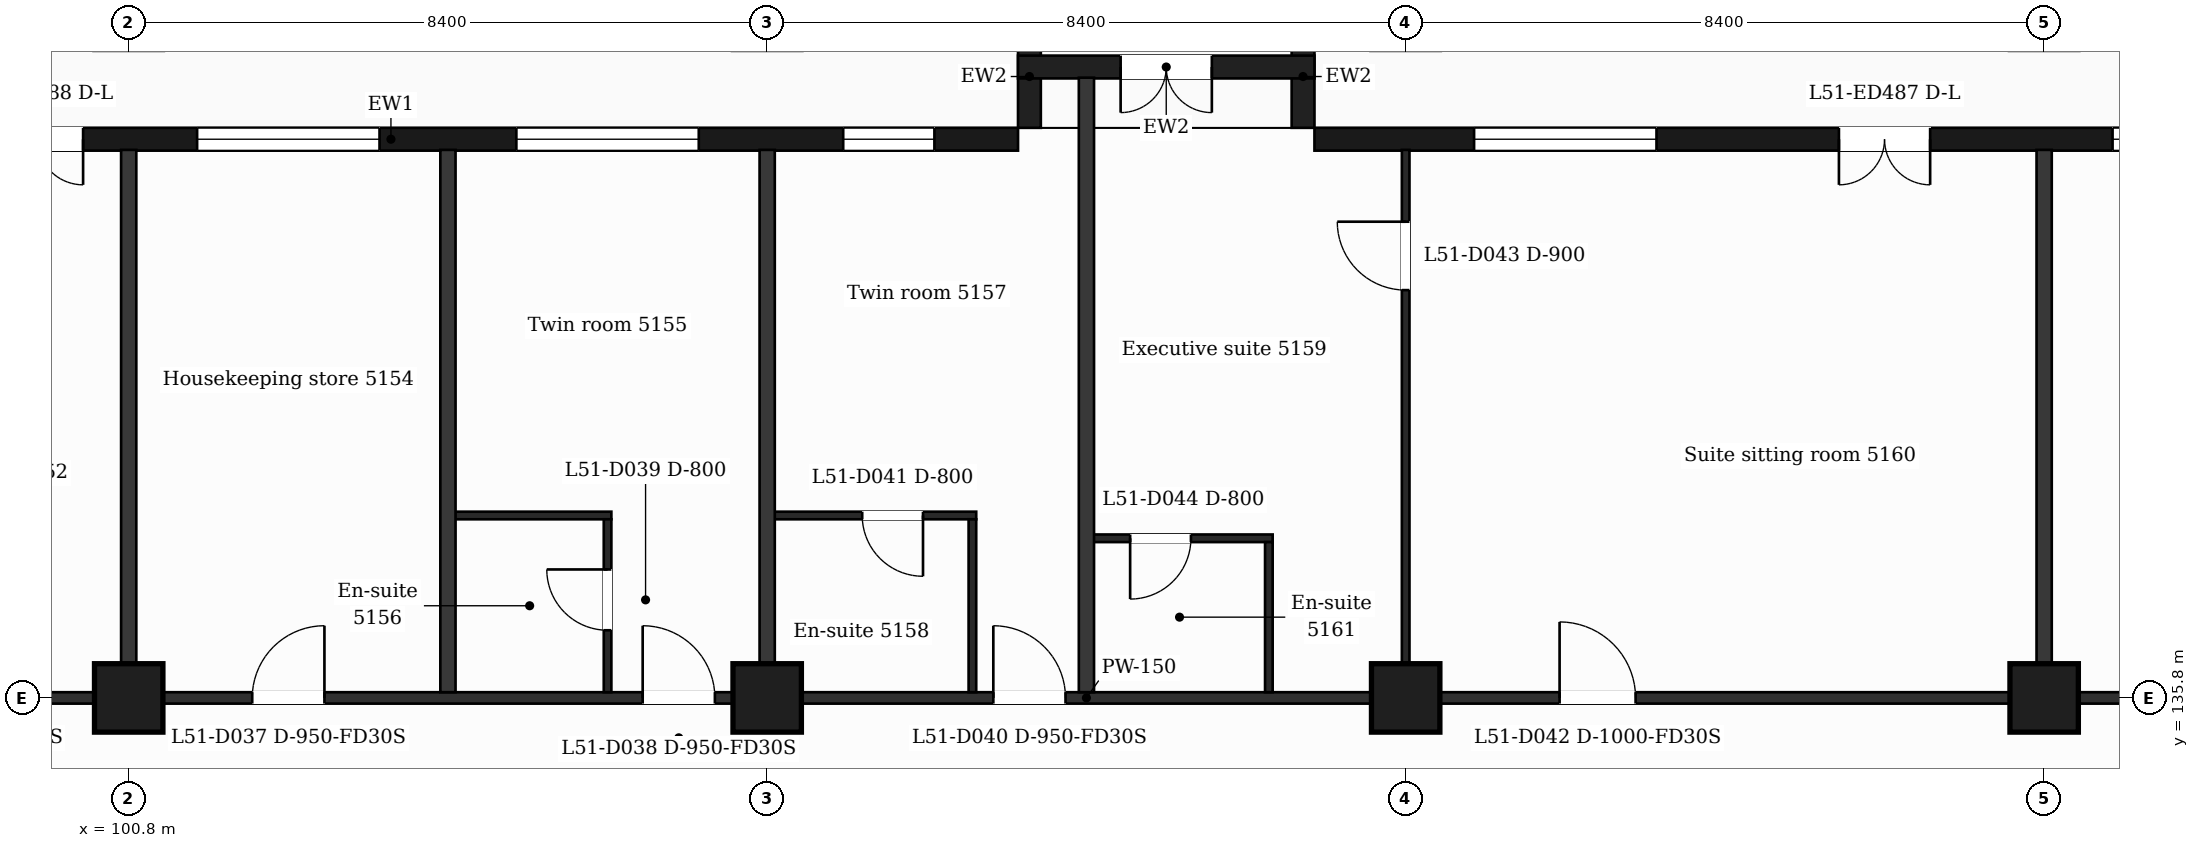
"""IFC4 building model, lengths in metres.
Left out: names, types, materials, properties, quantities, classifications, styles, units other than length and angle.
Written with IfcOpenShell. Run it as: python <this file> out.ifc"""

import sys

from ifc_helpers import new_model, si_unit, direction, frame, frame_2d, origin, origin_2d, place, context, subcontext, project, spatial, rectangle, extrude, element, fill, save


model = new_model("IFC4")
c1 = context("Model", 3, precision=1e-05, world=origin(), true_north=direction((0.0, 1.0)))
c2 = subcontext(c1, "Body", "Model", "MODEL_VIEW")
j1 = project(units=[si_unit("LENGTHUNIT", "METRE"), si_unit("PLANEANGLEUNIT", "RADIAN")], contexts=[c1])
p1 = place(None, origin())
s1 = spatial("IfcSite", under=j1, at=p1, CompositionType="ELEMENT")
p2 = place(p1, origin())
s2 = spatial("IfcBuilding", under=s1, at=p2, CompositionType="ELEMENT")
p3 = place(p2, frame((0.0, 0.0, 213.3)))
s3 = spatial("IfcBuildingStorey", under=s2, at=p3, CompositionType="ELEMENT", Elevation=213.3)
for number, where, z_axis, x_axis in (
    (1, (100.8, 135.8, 0.0), (0.0, 0.0, 1.0), (1.0, 0.0, 0.0)),
    (2, (109.2, 135.8, 0.0), (0.0, 0.0, 1.0), (1.0, 0.0, 0.0)),
    (3, (117.6, 135.8, 0.0), (0.0, 0.0, 1.0), (1.0, 0.0, 0.0)),
    (4, (126.0, 135.8, 0.0), (0.0, 0.0, 1.0), (1.0, 0.0, 0.0)),
):
    element("IfcColumn", number, at=place(p3, frame(where, z_axis=z_axis, x_axis=x_axis)), inside=s3, PredefinedType="COLUMN", context=c2, shape_type="SweptSolid", body=[
        extrude(rectangle(XDim=0.9, YDim=0.9, at=origin_2d()), origin(), (0.0, 0.0, 1.0), 3.7),
    ])
p4 = place(p3, frame((130.65, 143.15, 0.0), z_axis=(0.0, 0.0, 1.0), x_axis=(-1.0, 0.0, 0.0)))
e5 = element("IfcWall", 5, at=p4, inside=s3, PredefinedType="SOLIDWALL", context=c2, shape_type="SweptSolid", body=[
    extrude(rectangle(XDim=14.25, YDim=0.3, at=frame_2d((7.125, 0.0))), origin(), (0.0, 0.0, 1.0), 3.38),
])
p5 = place(p4, frame((1.35, 0.0, 0.9)))
e6 = element("IfcOpeningElement", 6, at=p5, cuts=e5, PredefinedType="OPENING", context=c2, shape_type="SweptSolid", body=[
    extrude(rectangle(XDim=2.4, YDim=2.1, at=frame_2d((1.2, 1.05))), frame((0.0, 0.16, 0.0), z_axis=(0.0, -1.0, 0.0), x_axis=(1.0, 0.0, 0.0)), (0.0, 0.0, 1.0), 0.32),
])
p6 = place(p4, frame((6.15, 0.0, 0.0)))
e7 = element("IfcOpeningElement", 7, at=p6, cuts=e5, PredefinedType="OPENING", context=c2, shape_type="SweptSolid", body=[
    extrude(rectangle(XDim=1.2, YDim=2.4, at=frame_2d((0.6, 1.2))), frame((0.0, 0.16, 0.0), z_axis=(0.0, -1.0, 0.0), x_axis=(1.0, 0.0, 0.0)), (0.0, 0.0, 1.0), 0.32),
])
p7 = place(p4, frame((9.75, 0.0, 0.9)))
e8 = element("IfcOpeningElement", 8, at=p7, cuts=e5, PredefinedType="OPENING", context=c2, shape_type="SweptSolid", body=[
    extrude(rectangle(XDim=2.4, YDim=2.1, at=frame_2d((1.2, 1.05))), frame((0.0, 0.16, 0.0), z_axis=(0.0, -1.0, 0.0), x_axis=(1.0, 0.0, 0.0)), (0.0, 0.0, 1.0), 0.32),
])
p8 = place(p3, frame((112.5, 143.15, 0.0), z_axis=(0.0, 0.0, 1.0), x_axis=(-1.0, 0.0, 0.0)))
e9 = element("IfcWall", 9, at=p8, inside=s3, PredefinedType="SOLIDWALL", context=c2, shape_type="SweptSolid", body=[
    extrude(rectangle(XDim=16.5, YDim=0.3, at=frame_2d((8.25, 0.0))), origin(), (0.0, 0.0, 1.0), 3.38),
])
p9 = place(p8, frame((1.1, 0.0, 0.9)))
e10 = element("IfcOpeningElement", 10, at=p9, cuts=e9, PredefinedType="OPENING", context=c2, shape_type="SweptSolid", body=[
    extrude(rectangle(XDim=1.2, YDim=2.1, at=frame_2d((0.6, 1.05))), frame((0.0, 0.16, 0.0), z_axis=(0.0, -1.0, 0.0), x_axis=(1.0, 0.0, 0.0)), (0.0, 0.0, 1.0), 0.32),
])
p10 = place(p8, frame((4.2, 0.0, 0.9)))
e11 = element("IfcOpeningElement", 11, at=p10, cuts=e9, PredefinedType="OPENING", context=c2, shape_type="SweptSolid", body=[
    extrude(rectangle(XDim=2.4, YDim=2.1, at=frame_2d((1.2, 1.05))), frame((0.0, 0.16, 0.0), z_axis=(0.0, -1.0, 0.0), x_axis=(1.0, 0.0, 0.0)), (0.0, 0.0, 1.0), 0.32),
])
p11 = place(p8, frame((8.4, 0.0, 0.9)))
e12 = element("IfcOpeningElement", 12, at=p11, cuts=e9, PredefinedType="OPENING", context=c2, shape_type="SweptSolid", body=[
    extrude(rectangle(XDim=2.4, YDim=2.1, at=frame_2d((1.2, 1.05))), frame((0.0, 0.16, 0.0), z_axis=(0.0, -1.0, 0.0), x_axis=(1.0, 0.0, 0.0)), (0.0, 0.0, 1.0), 0.32),
])
p12 = place(p8, frame((12.3, 0.0, 0.0)))
e13 = element("IfcOpeningElement", 13, at=p12, cuts=e9, PredefinedType="OPENING", context=c2, shape_type="SweptSolid", body=[
    extrude(rectangle(XDim=1.2, YDim=2.4, at=frame_2d((0.6, 1.2))), frame((0.0, 0.16, 0.0), z_axis=(0.0, -1.0, 0.0), x_axis=(1.0, 0.0, 0.0)), (0.0, 0.0, 1.0), 0.32),
])
p13 = place(p8, frame((14.1, 0.0, 0.9)))
e14 = element("IfcOpeningElement", 14, at=p13, cuts=e9, PredefinedType="OPENING", context=c2, shape_type="SweptSolid", body=[
    extrude(rectangle(XDim=1.2, YDim=2.1, at=frame_2d((0.6, 1.05))), frame((0.0, 0.16, 0.0), z_axis=(0.0, -1.0, 0.0), x_axis=(1.0, 0.0, 0.0)), (0.0, 0.0, 1.0), 0.32),
])
for number, where, z_axis, x_axis in (
    (15, (116.25, 143.3, 0.0), (0.0, 0.0, 1.0), (0.0, 1.0, 0.0)),
    (16, (112.65, 143.3, 0.0), (0.0, 0.0, 1.0), (0.0, 1.0, 0.0)),
):
    element("IfcWall", number, at=place(p3, frame(where, z_axis=z_axis, x_axis=x_axis)), inside=s3, PredefinedType="SOLIDWALL", context=c2, shape_type="SweptSolid", body=[
        extrude(rectangle(XDim=1.35, YDim=0.3, at=frame_2d((0.675, 0.0))), origin(), (0.0, 0.0, 1.0), 3.38),
    ])
p14 = place(p3, frame((116.4, 144.1, 0.0), z_axis=(0.0, 0.0, 1.0), x_axis=(-1.0, 0.0, 0.0)))
e17 = element("IfcWall", 17, at=p14, inside=s3, PredefinedType="SOLIDWALL", context=c2, shape_type="SweptSolid", body=[
    extrude(rectangle(XDim=3.9, YDim=0.3, at=frame_2d((1.95, 0.0))), origin(), (0.0, 0.0, 1.0), 3.38),
])
p15 = place(p14, frame((1.35, 0.0, 0.0)))
e18 = element("IfcOpeningElement", 18, at=p15, cuts=e17, PredefinedType="OPENING", context=c2, shape_type="SweptSolid", body=[
    extrude(rectangle(XDim=1.2, YDim=2.4, at=frame_2d((0.6, 1.2))), frame((0.0, 0.16, 0.0), z_axis=(0.0, -1.0, 0.0), x_axis=(1.0, 0.0, 0.0)), (0.0, 0.0, 1.0), 0.32),
])
p16 = place(p3, frame((90.895, 135.8, 0.0), z_axis=(0.0, 0.0, 1.0), x_axis=(1.0, 0.0, 0.0)))
e19 = element("IfcWall", 19, at=p16, inside=s3, PredefinedType="PARTITIONING", context=c2, shape_type="SweptSolid", body=[
    extrude(rectangle(XDim=45.011, YDim=0.15, at=frame_2d((22.505, 0.0))), origin(), (0.0, 0.0, 1.0), 3.38),
])
p17 = place(p16, frame((6.906, 0.0, 0.0)))
e20 = element("IfcOpeningElement", 20, at=p17, cuts=e19, PredefinedType="OPENING", context=c2, shape_type="SweptSolid", body=[
    extrude(rectangle(XDim=1.0, YDim=2.1, at=frame_2d((0.5, 1.05))), frame((0.0, 0.085, 0.0), z_axis=(0.0, -1.0, 0.0), x_axis=(1.0, 0.0, 0.0)), (0.0, 0.0, 1.0), 0.17),
])
p18 = place(p16, frame((11.531, 0.0, 0.0)))
e21 = element("IfcOpeningElement", 21, at=p18, cuts=e19, PredefinedType="OPENING", context=c2, shape_type="SweptSolid", body=[
    extrude(rectangle(XDim=0.95, YDim=2.1, at=frame_2d((0.475, 1.05))), frame((0.0, 0.085, 0.0), z_axis=(0.0, -1.0, 0.0), x_axis=(1.0, 0.0, 0.0)), (0.0, 0.0, 1.0), 0.17),
])
p19 = place(p16, frame((16.667, 0.0, 0.0)))
e22 = element("IfcOpeningElement", 22, at=p19, cuts=e19, PredefinedType="OPENING", context=c2, shape_type="SweptSolid", body=[
    extrude(rectangle(XDim=0.95, YDim=2.1, at=frame_2d((0.475, 1.05))), frame((0.0, 0.085, 0.0), z_axis=(0.0, -1.0, 0.0), x_axis=(1.0, 0.0, 0.0)), (0.0, 0.0, 1.0), 0.17),
])
p20 = place(p16, frame((21.281, 0.0, 0.0)))
e23 = element("IfcOpeningElement", 23, at=p20, cuts=e19, PredefinedType="OPENING", context=c2, shape_type="SweptSolid", body=[
    extrude(rectangle(XDim=0.95, YDim=2.1, at=frame_2d((0.475, 1.05))), frame((0.0, 0.085, 0.0), z_axis=(0.0, -1.0, 0.0), x_axis=(1.0, 0.0, 0.0)), (0.0, 0.0, 1.0), 0.17),
])
p21 = place(p16, frame((28.73, 0.0, 0.0)))
e24 = element("IfcOpeningElement", 24, at=p21, cuts=e19, PredefinedType="OPENING", context=c2, shape_type="SweptSolid", body=[
    extrude(rectangle(XDim=1.0, YDim=2.1, at=frame_2d((0.5, 1.05))), frame((0.0, 0.085, 0.0), z_axis=(0.0, -1.0, 0.0), x_axis=(1.0, 0.0, 0.0)), (0.0, 0.0, 1.0), 0.17),
])
p22 = place(p16, frame((39.814, 0.0, 0.0)))
e25 = element("IfcOpeningElement", 25, at=p22, cuts=e19, PredefinedType="OPENING", context=c2, shape_type="SweptSolid", body=[
    extrude(rectangle(XDim=0.95, YDim=2.1, at=frame_2d((0.475, 1.05))), frame((0.0, 0.085, 0.0), z_axis=(0.0, -1.0, 0.0), x_axis=(1.0, 0.0, 0.0)), (0.0, 0.0, 1.0), 0.17),
])
p23 = place(p3, frame((113.4, 137.9, 0.0), z_axis=(0.0, 0.0, 1.0), x_axis=(1.0, 0.0, 0.0)))
e26 = element("IfcWall", 26, at=p23, inside=s3, PredefinedType="PARTITIONING", context=c2, shape_type="SweptSolid", body=[
    extrude(rectangle(XDim=2.45, YDim=0.1, at=frame_2d((1.225, 0.0))), origin(), (0.0, 0.0, 1.0), 3.38),
])
p24 = place(p23, frame((0.575, 0.0, 0.0)))
e27 = element("IfcOpeningElement", 27, at=p24, cuts=e26, PredefinedType="OPENING", context=c2, shape_type="SweptSolid", body=[
    extrude(rectangle(XDim=0.8, YDim=2.1, at=frame_2d((0.4, 1.05))), frame((0.0, 0.06, 0.0), z_axis=(0.0, -1.0, 0.0), x_axis=(1.0, 0.0, 0.0)), (0.0, 0.0, 1.0), 0.12),
])
p25 = place(p3, frame((105.0, 138.2, 0.0), z_axis=(0.0, 0.0, 1.0), x_axis=(1.0, 0.0, 0.0)))
e28 = element("IfcWall", 28, at=p25, inside=s3, PredefinedType="PARTITIONING", context=c2, shape_type="SweptSolid", body=[
    extrude(rectangle(XDim=2.15, YDim=0.1, at=frame_2d((1.075, 0.0))), origin(), (0.0, 0.0, 1.0), 3.38),
])
p26 = place(p3, frame((109.2, 138.2, 0.0), z_axis=(0.0, 0.0, 1.0), x_axis=(1.0, 0.0, 0.0)))
e29 = element("IfcWall", 29, at=p26, inside=s3, PredefinedType="PARTITIONING", context=c2, shape_type="SweptSolid", body=[
    extrude(rectangle(XDim=2.75, YDim=0.1, at=frame_2d((1.375, 0.0))), origin(), (0.0, 0.0, 1.0), 3.38),
])
p27 = place(p26, frame((1.25, 0.0, 0.0)))
e30 = element("IfcOpeningElement", 30, at=p27, cuts=e29, PredefinedType="OPENING", context=c2, shape_type="SweptSolid", body=[
    extrude(rectangle(XDim=0.8, YDim=2.1, at=frame_2d((0.4, 1.05))), frame((0.0, 0.06, 0.0), z_axis=(0.0, -1.0, 0.0), x_axis=(1.0, 0.0, 0.0)), (0.0, 0.0, 1.0), 0.12),
])
for number, where, z_axis, x_axis in (
    (31, (100.8, 135.875, 0.0), (0.0, 0.0, 1.0), (0.0, 1.0, 0.0)),
    (32, (105.0, 135.875, 0.0), (0.0, 0.0, 1.0), (0.0, 1.0, 0.0)),
):
    element("IfcWall", number, at=place(p3, frame(where, z_axis=z_axis, x_axis=x_axis)), inside=s3, PredefinedType="PARTITIONING", context=c2, shape_type="SweptSolid", body=[
        extrude(rectangle(XDim=7.135, YDim=0.2, at=frame_2d((3.567, 0.0))), origin(), (0.0, 0.0, 1.0), 3.38),
    ])
p28 = place(p3, frame((107.1, 135.875, 0.0), z_axis=(0.0, 0.0, 1.0), x_axis=(0.0, 1.0, 0.0)))
e33 = element("IfcWall", 33, at=p28, inside=s3, PredefinedType="PARTITIONING", context=c2, shape_type="SweptSolid", body=[
    extrude(rectangle(XDim=2.275, YDim=0.1, at=frame_2d((1.137, 0.0))), origin(), (0.0, 0.0, 1.0), 3.38),
])
p29 = place(p28, frame((0.815, 0.0, 0.0)))
e34 = element("IfcOpeningElement", 34, at=p29, cuts=e33, PredefinedType="OPENING", context=c2, shape_type="SweptSolid", body=[
    extrude(rectangle(XDim=0.8, YDim=2.1, at=frame_2d((0.4, 1.05))), frame((0.0, 0.06, 0.0), z_axis=(0.0, -1.0, 0.0), x_axis=(1.0, 0.0, 0.0)), (0.0, 0.0, 1.0), 0.12),
])
p30 = place(p3, frame((109.2, 135.875, 0.0), z_axis=(0.0, 0.0, 1.0), x_axis=(0.0, 1.0, 0.0)))
e35 = element("IfcWall", 35, at=p30, inside=s3, PredefinedType="PARTITIONING", context=c2, shape_type="SweptSolid", body=[
    extrude(rectangle(XDim=7.135, YDim=0.2, at=frame_2d((3.567, 0.0))), origin(), (0.0, 0.0, 1.0), 3.38),
])
p31 = place(p3, frame((111.9, 135.875, 0.0), z_axis=(0.0, 0.0, 1.0), x_axis=(0.0, 1.0, 0.0)))
e36 = element("IfcWall", 36, at=p31, inside=s3, PredefinedType="PARTITIONING", context=c2, shape_type="SweptSolid", body=[
    extrude(rectangle(XDim=2.275, YDim=0.1, at=frame_2d((1.137, 0.0))), origin(), (0.0, 0.0, 1.0), 3.38),
])
p32 = place(p3, frame((113.4, 135.875, 0.0), z_axis=(0.0, 0.0, 1.0), x_axis=(0.0, 1.0, 0.0)))
e37 = element("IfcWall", 37, at=p32, inside=s3, PredefinedType="PARTITIONING", context=c2, shape_type="SweptSolid", body=[
    extrude(rectangle(XDim=8.085, YDim=0.2, at=frame_2d((4.042, 0.0))), origin(), (0.0, 0.0, 1.0), 3.38),
])
p33 = place(p3, frame((115.8, 135.875, 0.0), z_axis=(0.0, 0.0, 1.0), x_axis=(0.0, 1.0, 0.0)))
e38 = element("IfcWall", 38, at=p33, inside=s3, PredefinedType="PARTITIONING", context=c2, shape_type="SweptSolid", body=[
    extrude(rectangle(XDim=1.975, YDim=0.1, at=frame_2d((0.988, 0.0))), origin(), (0.0, 0.0, 1.0), 3.38),
])
p34 = place(p3, frame((117.6, 135.875, 0.0), z_axis=(0.0, 0.0, 1.0), x_axis=(0.0, 1.0, 0.0)))
e39 = element("IfcWall", 39, at=p34, inside=s3, PredefinedType="PARTITIONING", context=c2, shape_type="SweptSolid", body=[
    extrude(rectangle(XDim=7.135, YDim=0.1, at=frame_2d((3.567, 0.0))), origin(), (0.0, 0.0, 1.0), 3.38),
])
p35 = place(p34, frame((5.29, 0.0, 0.0)))
e40 = element("IfcOpeningElement", 40, at=p35, cuts=e39, PredefinedType="OPENING", context=c2, shape_type="SweptSolid", body=[
    extrude(rectangle(XDim=0.9, YDim=2.1, at=frame_2d((0.45, 1.05))), frame((0.0, 0.06, 0.0), z_axis=(0.0, -1.0, 0.0), x_axis=(1.0, 0.0, 0.0)), (0.0, 0.0, 1.0), 0.12),
])
p36 = place(p3, frame((126.0, 135.875, 0.0), z_axis=(0.0, 0.0, 1.0), x_axis=(0.0, 1.0, 0.0)))
e41 = element("IfcWall", 41, at=p36, inside=s3, PredefinedType="PARTITIONING", context=c2, shape_type="SweptSolid", body=[
    extrude(rectangle(XDim=7.135, YDim=0.2, at=frame_2d((3.567, 0.0))), origin(), (0.0, 0.0, 1.0), 3.38),
])
p37 = place(p5, origin())
e42 = element("IfcWindow", 42, at=p37, inside=s3, PartitioningType="SINGLE_PANEL", PredefinedType="WINDOW", context=c2, shape_type="SweptSolid", body=[
    extrude(rectangle(XDim=2.4, YDim=2.1, at=frame_2d((1.2, 1.05))), frame((0.0, 0.03, 0.0), z_axis=(0.0, -1.0, 0.0), x_axis=(1.0, 0.0, 0.0)), (0.0, 0.0, 1.0), 0.06),
])
fill(e6, e42)
p38 = place(p6, origin())
e43 = element("IfcDoor", 43, at=p38, inside=s3, OperationType="DOUBLE_DOOR_SINGLE_SWING", PredefinedType="DOOR", context=c2, shape_type="SweptSolid", body=[
    extrude(rectangle(XDim=1.2, YDim=2.4, at=frame_2d((0.6, 1.2))), frame((0.0, 0.025, 0.0), z_axis=(0.0, -1.0, 0.0), x_axis=(1.0, 0.0, 0.0)), (0.0, 0.0, 1.0), 0.05),
])
fill(e7, e43)
p39 = place(p7, origin())
e44 = element("IfcWindow", 44, at=p39, inside=s3, PartitioningType="SINGLE_PANEL", PredefinedType="WINDOW", context=c2, shape_type="SweptSolid", body=[
    extrude(rectangle(XDim=2.4, YDim=2.1, at=frame_2d((1.2, 1.05))), frame((0.0, 0.03, 0.0), z_axis=(0.0, -1.0, 0.0), x_axis=(1.0, 0.0, 0.0)), (0.0, 0.0, 1.0), 0.06),
])
fill(e8, e44)
p40 = place(p9, origin())
e45 = element("IfcWindow", 45, at=p40, inside=s3, PartitioningType="SINGLE_PANEL", PredefinedType="WINDOW", context=c2, shape_type="SweptSolid", body=[
    extrude(rectangle(XDim=1.2, YDim=2.1, at=frame_2d((0.6, 1.05))), frame((0.0, 0.03, 0.0), z_axis=(0.0, -1.0, 0.0), x_axis=(1.0, 0.0, 0.0)), (0.0, 0.0, 1.0), 0.06),
])
fill(e10, e45)
p41 = place(p10, origin())
e46 = element("IfcWindow", 46, at=p41, inside=s3, PartitioningType="SINGLE_PANEL", PredefinedType="WINDOW", context=c2, shape_type="SweptSolid", body=[
    extrude(rectangle(XDim=2.4, YDim=2.1, at=frame_2d((1.2, 1.05))), frame((0.0, 0.03, 0.0), z_axis=(0.0, -1.0, 0.0), x_axis=(1.0, 0.0, 0.0)), (0.0, 0.0, 1.0), 0.06),
])
fill(e11, e46)
p42 = place(p11, origin())
e47 = element("IfcWindow", 47, at=p42, inside=s3, PartitioningType="SINGLE_PANEL", PredefinedType="WINDOW", context=c2, shape_type="SweptSolid", body=[
    extrude(rectangle(XDim=2.4, YDim=2.1, at=frame_2d((1.2, 1.05))), frame((0.0, 0.03, 0.0), z_axis=(0.0, -1.0, 0.0), x_axis=(1.0, 0.0, 0.0)), (0.0, 0.0, 1.0), 0.06),
])
fill(e12, e47)
p43 = place(p12, origin())
e48 = element("IfcDoor", 48, at=p43, inside=s3, OperationType="DOUBLE_DOOR_SINGLE_SWING", PredefinedType="DOOR", context=c2, shape_type="SweptSolid", body=[
    extrude(rectangle(XDim=1.2, YDim=2.4, at=frame_2d((0.6, 1.2))), frame((0.0, 0.025, 0.0), z_axis=(0.0, -1.0, 0.0), x_axis=(1.0, 0.0, 0.0)), (0.0, 0.0, 1.0), 0.05),
])
fill(e13, e48)
p44 = place(p15, origin())
e49 = element("IfcDoor", 49, at=p44, inside=s3, OperationType="DOUBLE_DOOR_SINGLE_SWING", PredefinedType="DOOR", context=c2, shape_type="SweptSolid", body=[
    extrude(rectangle(XDim=1.2, YDim=2.4, at=frame_2d((0.6, 1.2))), frame((0.0, 0.025, 0.0), z_axis=(0.0, -1.0, 0.0), x_axis=(1.0, 0.0, 0.0)), (0.0, 0.0, 1.0), 0.05),
])
fill(e18, e49)
p45 = place(p18, origin())
e50 = element("IfcDoor", 50, at=p45, inside=s3, OperationType="SINGLE_SWING_RIGHT", PredefinedType="DOOR", context=c2, shape_type="SweptSolid", body=[
    extrude(rectangle(XDim=0.95, YDim=2.1, at=frame_2d((0.475, 1.05))), frame((0.0, 0.025, 0.0), z_axis=(0.0, -1.0, 0.0), x_axis=(1.0, 0.0, 0.0)), (0.0, 0.0, 1.0), 0.05),
])
fill(e21, e50)
p46 = place(p19, origin())
e51 = element("IfcDoor", 51, at=p46, inside=s3, OperationType="SINGLE_SWING_LEFT", PredefinedType="DOOR", context=c2, shape_type="SweptSolid", body=[
    extrude(rectangle(XDim=0.95, YDim=2.1, at=frame_2d((0.475, 1.05))), frame((0.0, 0.025, 0.0), z_axis=(0.0, -1.0, 0.0), x_axis=(1.0, 0.0, 0.0)), (0.0, 0.0, 1.0), 0.05),
])
fill(e22, e51)
p47 = place(p29, origin())
e52 = element("IfcDoor", 52, at=p47, inside=s3, OperationType="SINGLE_SWING_RIGHT", PredefinedType="DOOR", context=c2, shape_type="SweptSolid", body=[
    extrude(rectangle(XDim=0.8, YDim=2.1, at=frame_2d((0.4, 1.05))), frame((0.0, 0.025, 0.0), z_axis=(0.0, -1.0, 0.0), x_axis=(1.0, 0.0, 0.0)), (0.0, 0.0, 1.0), 0.05),
])
fill(e34, e52)
p48 = place(p20, origin())
e53 = element("IfcDoor", 53, at=p48, inside=s3, OperationType="SINGLE_SWING_LEFT", PredefinedType="DOOR", context=c2, shape_type="SweptSolid", body=[
    extrude(rectangle(XDim=0.95, YDim=2.1, at=frame_2d((0.475, 1.05))), frame((0.0, 0.025, 0.0), z_axis=(0.0, -1.0, 0.0), x_axis=(1.0, 0.0, 0.0)), (0.0, 0.0, 1.0), 0.05),
])
fill(e23, e53)
p49 = place(p27, origin())
e54 = element("IfcDoor", 54, at=p49, inside=s3, OperationType="SINGLE_SWING_RIGHT", PredefinedType="DOOR", context=c2, shape_type="SweptSolid", body=[
    extrude(rectangle(XDim=0.8, YDim=2.1, at=frame_2d((0.4, 1.05))), frame((0.0, 0.025, 0.0), z_axis=(0.0, -1.0, 0.0), x_axis=(1.0, 0.0, 0.0)), (0.0, 0.0, 1.0), 0.05),
])
fill(e30, e54)
p50 = place(p21, origin())
e55 = element("IfcDoor", 55, at=p50, inside=s3, OperationType="SINGLE_SWING_LEFT", PredefinedType="DOOR", context=c2, shape_type="SweptSolid", body=[
    extrude(rectangle(XDim=1.0, YDim=2.1, at=frame_2d((0.5, 1.05))), frame((0.0, 0.025, 0.0), z_axis=(0.0, -1.0, 0.0), x_axis=(1.0, 0.0, 0.0)), (0.0, 0.0, 1.0), 0.05),
])
fill(e24, e55)
p51 = place(p35, origin())
e56 = element("IfcDoor", 56, at=p51, inside=s3, OperationType="SINGLE_SWING_RIGHT", PredefinedType="DOOR", context=c2, shape_type="SweptSolid", body=[
    extrude(rectangle(XDim=0.9, YDim=2.1, at=frame_2d((0.45, 1.05))), frame((0.0, 0.025, 0.0), z_axis=(0.0, -1.0, 0.0), x_axis=(1.0, 0.0, 0.0)), (0.0, 0.0, 1.0), 0.05),
])
fill(e40, e56)
p52 = place(p24, origin())
e57 = element("IfcDoor", 57, at=p52, inside=s3, OperationType="SINGLE_SWING_LEFT", PredefinedType="DOOR", context=c2, shape_type="SweptSolid", body=[
    extrude(rectangle(XDim=0.8, YDim=2.1, at=frame_2d((0.4, 1.05))), frame((0.0, 0.025, 0.0), z_axis=(0.0, -1.0, 0.0), x_axis=(1.0, 0.0, 0.0)), (0.0, 0.0, 1.0), 0.05),
])
fill(e27, e57)
save(model, sys.argv[1])
